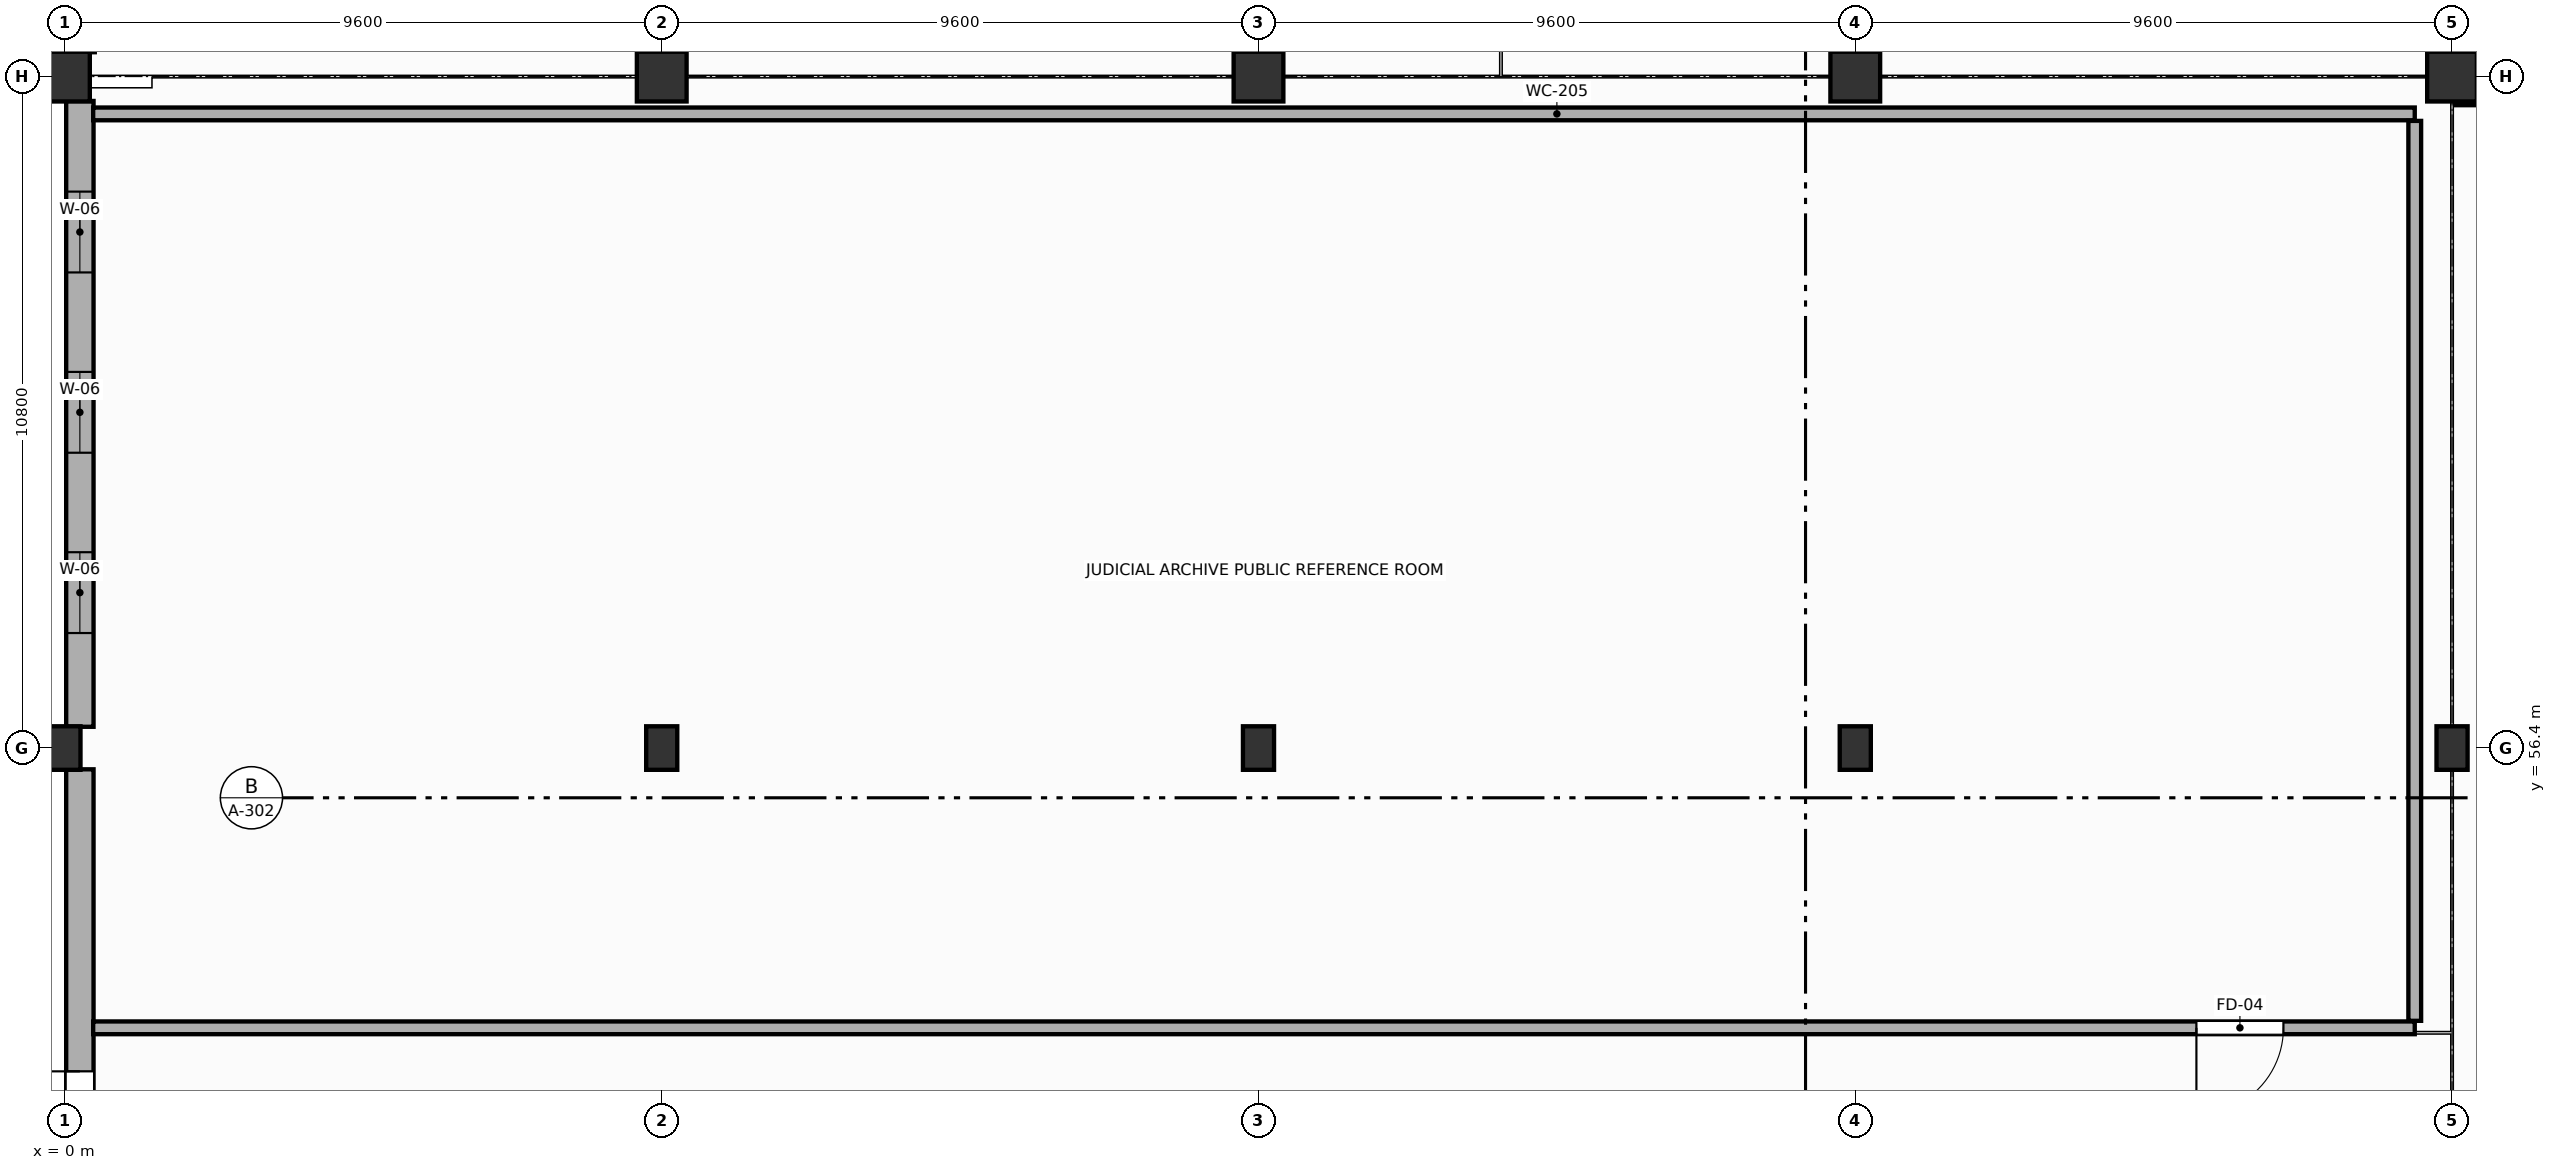
"""IFC4 building model, lengths in metres.
Left out: names, types, materials, properties, quantities, classifications, styles, units other than length and angle.
Written with IfcOpenShell. Run it as: python <this file> out.ifc"""

import sys

from ifc_helpers import new_model, si_unit, direction, frame, frame_2d, origin, origin_2d, place, context, subcontext, project, spatial, rectangle, extrude, element, fill, save


model = new_model("IFC4")
c1 = context("Model", 3, precision=1e-05, world=origin(), true_north=direction((0.0, 1.0)))
c2 = subcontext(c1, "Body", "Model", "MODEL_VIEW")
j1 = project(units=[si_unit("LENGTHUNIT", "METRE"), si_unit("PLANEANGLEUNIT", "RADIAN")], contexts=[c1])
p1 = place(None, origin())
s1 = spatial("IfcSite", under=j1, at=p1, CompositionType="ELEMENT")
p2 = place(p1, origin())
s2 = spatial("IfcBuilding", under=s1, at=p2, CompositionType="ELEMENT")
p3 = place(p2, origin())
s3 = spatial("IfcBuildingStorey", under=s2, at=p3, CompositionType="ELEMENT", Elevation=0.0)
for number, where, z_axis, x_axis in (
    (1, (0.0, 67.2, 0.0), (0.0, 0.0, 1.0), (1.0, 0.0, 0.0)),
    (2, (9.6, 67.2, 0.0), (0.0, 0.0, 1.0), (1.0, 0.0, 0.0)),
    (3, (19.2, 67.2, 0.0), (0.0, 0.0, 1.0), (1.0, 0.0, 0.0)),
    (4, (28.8, 67.2, 0.0), (0.0, 0.0, 1.0), (1.0, 0.0, 0.0)),
    (5, (38.4, 67.2, 0.0), (0.0, 0.0, 1.0), (1.0, 0.0, 0.0)),
):
    element("IfcColumn", number, at=place(p3, frame(where, z_axis=z_axis, x_axis=x_axis)), inside=s3, PredefinedType="COLUMN", context=c2, shape_type="SweptSolid", body=[
        extrude(rectangle(XDim=0.8, YDim=0.8, at=origin_2d()), origin(), (0.0, 0.0, 1.0), 5.4),
    ])
for number, where, z_axis, x_axis in (
    (6, (0.0, 56.4, 0.0), (0.0, 0.0, 1.0), (1.0, 0.0, 0.0)),
    (7, (9.6, 56.4, 0.0), (0.0, 0.0, 1.0), (1.0, 0.0, 0.0)),
    (8, (19.2, 56.4, 0.0), (0.0, 0.0, 1.0), (1.0, 0.0, 0.0)),
    (9, (28.8, 56.4, 0.0), (0.0, 0.0, 1.0), (1.0, 0.0, 0.0)),
    (10, (38.4, 56.4, 0.0), (0.0, 0.0, 1.0), (1.0, 0.0, 0.0)),
):
    element("IfcColumn", number, at=place(p3, frame(where, z_axis=z_axis, x_axis=x_axis)), inside=s3, PredefinedType="COLUMN", context=c2, shape_type="SweptSolid", body=[
        extrude(rectangle(XDim=0.5, YDim=0.7, at=origin_2d()), origin(), (0.0, 0.0, 1.0), 5.4),
    ])
p4 = place(p3, frame((0.24, 67.592, 0.0), z_axis=(0.0, 0.0, 1.0), x_axis=(0.0, 1.0, 0.0)))
e11 = element("IfcWall", 11, at=p4, inside=s3, PredefinedType="STANDARD", context=c2, shape_type="SweptSolid", body=[
    extrude(rectangle(XDim=6.416, YDim=0.48, at=frame_2d((3.208, 0.0))), origin(), (0.0, 0.0, 1.0), 4.28),
])
p5 = place(p4, frame((1.253, 0.0, 0.85)))
e12 = element("IfcOpeningElement", 12, at=p5, cuts=e11, PredefinedType="OPENING", context=c2, shape_type="SweptSolid", body=[
    extrude(rectangle(XDim=1.7, YDim=2.3, at=frame_2d((0.85, 1.15))), frame((0.0, 0.25, 0.0), z_axis=(0.0, -1.0, 0.0), x_axis=(1.0, 0.0, 0.0)), (0.0, 0.0, 1.0), 0.5),
])
p6 = place(p4, frame((3.703, 0.0, 0.85)))
e13 = element("IfcOpeningElement", 13, at=p6, cuts=e11, PredefinedType="OPENING", context=c2, shape_type="SweptSolid", body=[
    extrude(rectangle(XDim=1.7, YDim=2.3, at=frame_2d((0.85, 1.15))), frame((0.0, 0.25, 0.0), z_axis=(0.0, -1.0, 0.0), x_axis=(1.0, 0.0, 0.0)), (0.0, 0.0, 1.0), 0.5),
])
p7 = place(p3, frame((0.24, 47.142, 0.0), z_axis=(0.0, 0.0, 1.0), x_axis=(0.0, 1.0, 0.0)))
e14 = element("IfcWall", 14, at=p7, inside=s3, PredefinedType="STANDARD", context=c2, shape_type="SweptSolid", body=[
    extrude(rectangle(XDim=8.916, YDim=0.44, at=frame_2d((4.458, 0.0))), origin(), (0.0, 0.0, 1.0), 4.28),
])
p8 = place(p7, frame((2.258, 0.0, 0.0)))
e15 = element("IfcOpeningElement", 15, at=p8, cuts=e14, PredefinedType="OPENING", context=c2, shape_type="SweptSolid", body=[
    extrude(rectangle(XDim=1.8, YDim=2.25, at=frame_2d((0.9, 1.125))), frame((0.0, 0.23, 0.0), z_axis=(0.0, -1.0, 0.0), x_axis=(1.0, 0.0, 0.0)), (0.0, 0.0, 1.0), 0.46),
])
p9 = place(p3, frame((0.24, 56.742, 0.0), z_axis=(0.0, 0.0, 1.0), x_axis=(0.0, 1.0, 0.0)))
e16 = element("IfcWall", 16, at=p9, inside=s3, PredefinedType="STANDARD", context=c2, shape_type="SweptSolid", body=[
    extrude(rectangle(XDim=10.066, YDim=0.44, at=frame_2d((5.033, 0.0))), origin(), (0.0, 0.0, 1.0), 4.28),
])
p10 = place(p9, frame((1.508, 0.0, 0.9)))
e17 = element("IfcOpeningElement", 17, at=p10, cuts=e16, PredefinedType="OPENING", context=c2, shape_type="SweptSolid", body=[
    extrude(rectangle(XDim=1.3, YDim=2.1, at=frame_2d((0.65, 1.05))), frame((0.0, 0.23, 0.0), z_axis=(0.0, -1.0, 0.0), x_axis=(1.0, 0.0, 0.0)), (0.0, 0.0, 1.0), 0.46),
])
p11 = place(p9, frame((4.408, 0.0, 0.9)))
e18 = element("IfcOpeningElement", 18, at=p11, cuts=e16, PredefinedType="OPENING", context=c2, shape_type="SweptSolid", body=[
    extrude(rectangle(XDim=1.3, YDim=2.1, at=frame_2d((0.65, 1.05))), frame((0.0, 0.23, 0.0), z_axis=(0.0, -1.0, 0.0), x_axis=(1.0, 0.0, 0.0)), (0.0, 0.0, 1.0), 0.46),
])
p12 = place(p9, frame((7.308, 0.0, 0.9)))
e19 = element("IfcOpeningElement", 19, at=p12, cuts=e16, PredefinedType="OPENING", context=c2, shape_type="SweptSolid", body=[
    extrude(rectangle(XDim=1.3, YDim=2.1, at=frame_2d((0.65, 1.05))), frame((0.0, 0.23, 0.0), z_axis=(0.0, -1.0, 0.0), x_axis=(1.0, 0.0, 0.0)), (0.0, 0.0, 1.0), 0.46),
])
p13 = place(p3, frame((38.45, 66.96, 0.0), z_axis=(0.0, 0.0, 1.0), x_axis=(1.0, 0.0, 0.0)))
e20 = element("IfcWall", 20, at=p13, inside=s3, PredefinedType="STANDARD", context=c2, shape_type="SweptSolid", body=[
    extrude(rectangle(XDim=7.55, YDim=0.44, at=frame_2d((3.775, 0.0))), origin(), (0.0, 0.0, 1.0), 4.13),
])
p14 = place(p3, frame((0.454, 66.6, 0.0), z_axis=(0.0, 0.0, 1.0), x_axis=(1.0, 0.0, 0.0)))
e21 = element("IfcWall", 21, at=p14, inside=s3, PredefinedType="STANDARD", context=c2, shape_type="SweptSolid", body=[
    extrude(rectangle(XDim=37.346, YDim=0.205, at=frame_2d((18.673, 0.0))), origin(), (0.0, 0.0, 1.0), 4.28),
])
p15 = place(p3, frame((37.8, 51.9, 0.0), z_axis=(0.0, 0.0, 1.0), x_axis=(-1.0, 0.0, 0.0)))
e22 = element("IfcWall", 22, at=p15, inside=s3, PredefinedType="STANDARD", context=c2, shape_type="SweptSolid", body=[
    extrude(rectangle(XDim=37.346, YDim=0.205, at=frame_2d((18.673, 0.0))), origin(), (0.0, 0.0, 1.0), 4.13),
])
p16 = place(p15, frame((2.112, 0.0, 0.0)))
e23 = element("IfcOpeningElement", 23, at=p16, cuts=e22, PredefinedType="OPENING", context=c2, shape_type="SweptSolid", body=[
    extrude(rectangle(XDim=1.4, YDim=2.25, at=frame_2d((0.7, 1.125))), frame((0.0, 0.113, 0.0), z_axis=(0.0, -1.0, 0.0), x_axis=(1.0, 0.0, 0.0)), (0.0, 0.0, 1.0), 0.225),
])
p17 = place(p3, frame((37.8, 66.488, 0.0), z_axis=(0.0, 0.0, 1.0), x_axis=(0.0, -1.0, 0.0)))
e24 = element("IfcWall", 24, at=p17, inside=s3, PredefinedType="STANDARD", context=c2, shape_type="SweptSolid", body=[
    extrude(rectangle(XDim=14.475, YDim=0.205, at=frame_2d((7.238, 0.0))), origin(), (0.0, 0.0, 1.0), 4.33),
])
p18 = place(p8, origin())
e25 = element("IfcDoor", 25, at=p18, inside=s3, OperationType="DOUBLE_DOOR_SINGLE_SWING", PredefinedType="DOOR", context=c2, shape_type="SweptSolid", body=[
    extrude(rectangle(XDim=1.8, YDim=2.25, at=frame_2d((0.9, 1.125))), frame((0.0, 0.025, 0.0), z_axis=(0.0, -1.0, 0.0), x_axis=(1.0, 0.0, 0.0)), (0.0, 0.0, 1.0), 0.05),
])
fill(e15, e25)
p19 = place(p10, origin())
e26 = element("IfcWindow", 26, at=p19, inside=s3, PartitioningType="SINGLE_PANEL", PredefinedType="WINDOW", context=c2, shape_type="SweptSolid", body=[
    extrude(rectangle(XDim=1.3, YDim=2.1, at=frame_2d((0.65, 1.05))), frame((0.0, 0.03, 0.0), z_axis=(0.0, -1.0, 0.0), x_axis=(1.0, 0.0, 0.0)), (0.0, 0.0, 1.0), 0.06),
])
fill(e17, e26)
p20 = place(p11, origin())
e27 = element("IfcWindow", 27, at=p20, inside=s3, PartitioningType="SINGLE_PANEL", PredefinedType="WINDOW", context=c2, shape_type="SweptSolid", body=[
    extrude(rectangle(XDim=1.3, YDim=2.1, at=frame_2d((0.65, 1.05))), frame((0.0, 0.03, 0.0), z_axis=(0.0, -1.0, 0.0), x_axis=(1.0, 0.0, 0.0)), (0.0, 0.0, 1.0), 0.06),
])
fill(e18, e27)
p21 = place(p12, origin())
e28 = element("IfcWindow", 28, at=p21, inside=s3, PartitioningType="SINGLE_PANEL", PredefinedType="WINDOW", context=c2, shape_type="SweptSolid", body=[
    extrude(rectangle(XDim=1.3, YDim=2.1, at=frame_2d((0.65, 1.05))), frame((0.0, 0.03, 0.0), z_axis=(0.0, -1.0, 0.0), x_axis=(1.0, 0.0, 0.0)), (0.0, 0.0, 1.0), 0.06),
])
fill(e19, e28)
p22 = place(p16, origin())
e29 = element("IfcDoor", 29, at=p22, inside=s3, OperationType="SINGLE_SWING_RIGHT", PredefinedType="DOOR", context=c2, shape_type="SweptSolid", body=[
    extrude(rectangle(XDim=1.4, YDim=2.25, at=frame_2d((0.7, 1.125))), frame((0.0, 0.025, 0.0), z_axis=(0.0, -1.0, 0.0), x_axis=(1.0, 0.0, 0.0)), (0.0, 0.0, 1.0), 0.05),
])
fill(e23, e29)
save(model, sys.argv[1])
